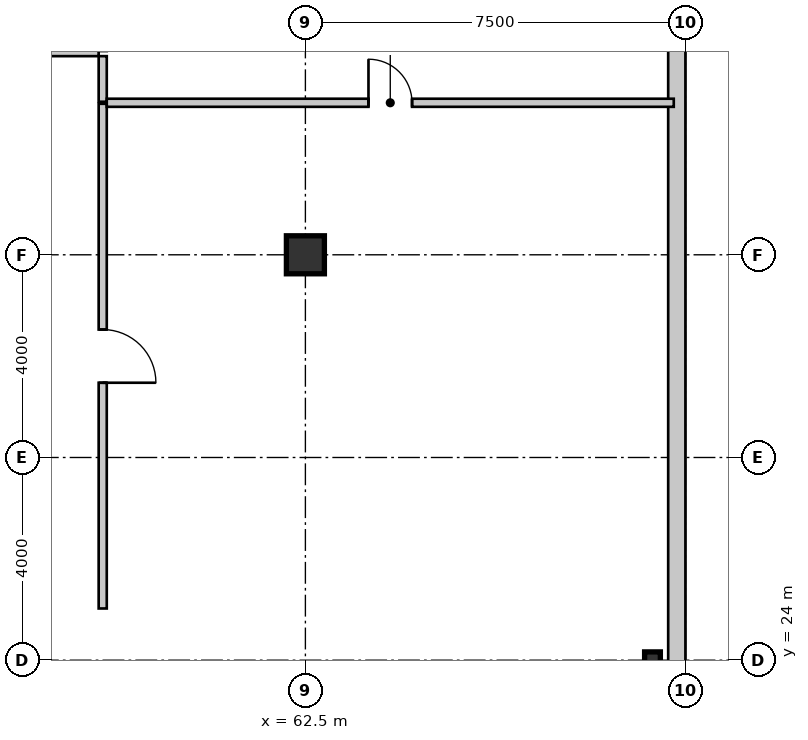
"""IFC4 building model, lengths in metres.
Left out: names, types, materials, properties, quantities, classifications, styles, units other than length and angle.
Written with IfcOpenShell. Run it as: python <this file> out.ifc"""

import sys

from ifc_helpers import new_model, si_unit, direction, frame, frame_2d, origin, origin_2d, place, context, subcontext, project, spatial, rectangle, circle, i_section, extrude, source, transform, mapped, element, fill, save


model = new_model("IFC4")
c1 = context("Model", 3, precision=1e-05, world=origin(), true_north=direction((0.0, 1.0)))
c2 = subcontext(c1, "Body", "Model", "MODEL_VIEW")
j1 = project(units=[si_unit("LENGTHUNIT", "METRE"), si_unit("PLANEANGLEUNIT", "RADIAN")], contexts=[c1])
p1 = place(None, origin())
s1 = spatial("IfcSite", under=j1, at=p1, CompositionType="ELEMENT")
p2 = place(p1, origin())
s2 = spatial("IfcBuilding", under=s1, at=p2, CompositionType="ELEMENT")
p3 = place(p2, frame((0.0, 0.0, 8.4)))
s3 = spatial("IfcBuildingStorey", under=s2, at=p3, CompositionType="ELEMENT", Elevation=8.4)
m1 = source(origin(), c2, "Body", "SweptSolid", [
    extrude(circle(Radius=0.375, at=origin_2d()), origin(), (0.0, 0.0, 1.0), 4.55),
])
p4 = place(p3, frame((62.5, 32.0, 0.0), z_axis=(0.0, 0.0, 1.0), x_axis=(1.0, 0.0, 0.0)))
e1 = element("IfcColumn", 1, at=p4, inside=s3, PredefinedType="COLUMN", context=c2, shape_type="MappedRepresentation", body=[
    mapped(m1, transform((0.0, 0.0, 0.0), scale=1.0)),
])
m2 = source(origin(), c2, "Body", "SweptSolid", [
    extrude(i_section(OverallWidth=0.311, OverallDepth=0.327, WebThickness=0.016, FlangeThickness=0.025, at=origin_2d()), origin(), (0.0, 0.0, 1.0), 4.55),
])
p5 = place(p3, frame((69.35, 24.0, 0.0), z_axis=(0.0, 0.0, 1.0), x_axis=(1.0, 0.0, 0.0)))
e2 = element("IfcColumn", 2, at=p5, inside=s3, PredefinedType="COLUMN", context=c2, shape_type="MappedRepresentation", body=[
    mapped(m2, transform((0.0, 0.0, 0.0), scale=1.0)),
])
m3 = source(origin(), c2, "Body", "SweptSolid", [
    extrude(rectangle(XDim=39.66, YDim=0.34, at=frame_2d((19.83, 0.0))), origin(), (0.0, 0.0, 1.0), 4.29),
])
p6 = place(p3, frame((69.83, 0.17, 0.0), z_axis=(0.0, 0.0, 1.0), x_axis=(0.0, 1.0, 0.0)))
e3 = element("IfcWall", 3, at=p6, inside=s3, PredefinedType="SOLIDWALL", context=c2, shape_type="MappedRepresentation", body=[
    mapped(m3, transform((0.0, 0.0, 0.0), scale=1.0)),
])
m4 = source(origin(), c2, "Body", "SweptSolid", [
    extrude(rectangle(XDim=1.8, YDim=1.6, at=frame_2d((0.9, 0.8))), frame((0.0, 0.18, 0.0), z_axis=(0.0, -1.0, 0.0), x_axis=(1.0, 0.0, 0.0)), (0.0, 0.0, 1.0), 0.36),
])
p7 = place(p6, frame((3.2, 0.0, 0.95)))
e4 = element("IfcOpeningElement", 4, at=p7, cuts=e3, PredefinedType="OPENING", context=c2, shape_type="MappedRepresentation", body=[
    mapped(m4, transform((0.0, 0.0, 0.0), scale=1.0)),
])
m5 = source(origin(), c2, "Body", "SweptSolid", [
    extrude(rectangle(XDim=1.5, YDim=1.5, at=frame_2d((0.75, 0.75))), frame((0.0, 0.18, 0.0), z_axis=(0.0, -1.0, 0.0), x_axis=(1.0, 0.0, 0.0)), (0.0, 0.0, 1.0), 0.36),
])
p8 = place(p6, frame((7.8, 0.0, 0.95)))
e5 = element("IfcOpeningElement", 5, at=p8, cuts=e3, PredefinedType="OPENING", context=c2, shape_type="MappedRepresentation", body=[
    mapped(m5, transform((0.0, 0.0, 0.0), scale=1.0)),
])
m6 = source(origin(), c2, "Body", "SweptSolid", [
    extrude(rectangle(XDim=1.2, YDim=1.5, at=frame_2d((0.6, 0.75))), frame((0.0, 0.18, 0.0), z_axis=(0.0, -1.0, 0.0), x_axis=(1.0, 0.0, 0.0)), (0.0, 0.0, 1.0), 0.36),
])
p9 = place(p6, frame((21.2, 0.0, 0.95)))
e6 = element("IfcOpeningElement", 6, at=p9, cuts=e3, PredefinedType="OPENING", context=c2, shape_type="MappedRepresentation", body=[
    mapped(m6, transform((0.0, 0.0, 0.0), scale=1.0)),
])
m7 = source(origin(), c2, "Body", "SweptSolid", [
    extrude(rectangle(XDim=2.4, YDim=1.8, at=frame_2d((1.2, 0.9))), frame((0.0, 0.18, 0.0), z_axis=(0.0, -1.0, 0.0), x_axis=(1.0, 0.0, 0.0)), (0.0, 0.0, 1.0), 0.36),
])
p10 = place(p6, frame((36.0, 0.0, 0.95)))
e7 = element("IfcOpeningElement", 7, at=p10, cuts=e3, PredefinedType="OPENING", context=c2, shape_type="MappedRepresentation", body=[
    mapped(m7, transform((0.0, 0.0, 0.0), scale=1.0)),
])
m8 = source(origin(), c2, "Body", "SweptSolid", [
    extrude(rectangle(XDim=9.959, YDim=0.16, at=frame_2d((4.98, 0.0))), origin(), (0.0, 0.0, 1.0), 4.29),
])
p11 = place(p3, frame((58.5, 34.98, 0.0), z_axis=(0.0, 0.0, 1.0), x_axis=(0.0, -1.0, 0.0)))
e8 = element("IfcWall", 8, at=p11, inside=s3, PredefinedType="PARTITIONING", context=c2, shape_type="MappedRepresentation", body=[
    mapped(m8, transform((0.0, 0.0, 0.0), scale=1.0)),
])
m9 = source(origin(), c2, "Body", "SweptSolid", [
    extrude(rectangle(XDim=1.05, YDim=2.1, at=frame_2d((0.525, 1.05))), frame((0.0, 0.09, 0.0), z_axis=(0.0, -1.0, 0.0), x_axis=(1.0, 0.0, 0.0)), (0.0, 0.0, 1.0), 0.18),
])
p12 = place(p11, frame((4.455, 0.0, 0.0)))
e9 = element("IfcOpeningElement", 9, at=p12, cuts=e8, PredefinedType="OPENING", context=c2, shape_type="MappedRepresentation", body=[
    mapped(m9, transform((0.0, 0.0, 0.0), scale=1.0)),
])
m10 = source(origin(), c2, "Body", "SweptSolid", [
    extrude(rectangle(XDim=0.9, YDim=0.16, at=frame_2d((0.45, 0.0))), origin(), (0.0, 0.0, 1.0), 4.29),
])
p13 = place(p3, frame((58.5, 35.92, 0.0), z_axis=(0.0, 0.0, 1.0), x_axis=(0.0, -1.0, 0.0)))
e10 = element("IfcWall", 10, at=p13, inside=s3, PredefinedType="PARTITIONING", context=c2, shape_type="MappedRepresentation", body=[
    mapped(m10, transform((0.0, 0.0, 0.0), scale=1.0)),
])
m11 = source(origin(), c2, "Body", "SweptSolid", [
    extrude(rectangle(XDim=2.84, YDim=0.16, at=frame_2d((1.42, 0.0))), origin(), (0.0, 0.0, 1.0), 4.29),
])
p14 = place(p3, frame((55.58, 36.0, 0.0), z_axis=(0.0, 0.0, 1.0), x_axis=(1.0, 0.0, 0.0)))
e11 = element("IfcWall", 11, at=p14, inside=s3, PredefinedType="PARTITIONING", context=c2, shape_type="MappedRepresentation", body=[
    mapped(m11, transform((0.0, 0.0, 0.0), scale=1.0)),
])
m12 = source(origin(), c2, "Body", "SweptSolid", [
    extrude(rectangle(XDim=11.19, YDim=0.16, at=frame_2d((5.595, 0.0))), origin(), (0.0, 0.0, 1.0), 4.29),
])
p15 = place(p3, frame((58.58, 35.0, 0.0), z_axis=(0.0, 0.0, 1.0), x_axis=(1.0, 0.0, 0.0)))
e12 = element("IfcWall", 12, at=p15, inside=s3, PredefinedType="PARTITIONING", context=c2, shape_type="MappedRepresentation", body=[
    mapped(m12, transform((0.0, 0.0, 0.0), scale=1.0)),
])
m13 = source(origin(), c2, "Body", "SweptSolid", [
    extrude(rectangle(XDim=0.86, YDim=2.1, at=frame_2d((0.43, 1.05))), frame((0.0, 0.09, 0.0), z_axis=(0.0, -1.0, 0.0), x_axis=(1.0, 0.0, 0.0)), (0.0, 0.0, 1.0), 0.18),
])
p16 = place(p15, frame((5.165, 0.0, 0.0)))
e13 = element("IfcOpeningElement", 13, at=p16, cuts=e12, PredefinedType="OPENING", context=c2, shape_type="MappedRepresentation", body=[
    mapped(m13, transform((0.0, 0.0, 0.0), scale=1.0)),
])
m14 = source(origin(), c2, "Body", "SweptSolid", [
    extrude(rectangle(XDim=1.05, YDim=2.1, at=frame_2d((0.525, 1.05))), frame((0.0, 0.025, 0.0), z_axis=(0.0, -1.0, 0.0), x_axis=(1.0, 0.0, 0.0)), (0.0, 0.0, 1.0), 0.05),
])
p17 = place(p12, origin())
e14 = element("IfcDoor", 14, at=p17, inside=s3, OperationType="SINGLE_SWING_RIGHT", PredefinedType="DOOR", context=c2, shape_type="MappedRepresentation", body=[
    mapped(m14, transform((0.0, 0.0, 0.0), scale=1.0)),
])
fill(e9, e14)
m15 = source(origin(), c2, "Body", "SweptSolid", [
    extrude(rectangle(XDim=0.86, YDim=2.1, at=frame_2d((0.43, 1.05))), frame((0.0, 0.025, 0.0), z_axis=(0.0, -1.0, 0.0), x_axis=(1.0, 0.0, 0.0)), (0.0, 0.0, 1.0), 0.05),
])
p18 = place(p16, origin())
e15 = element("IfcDoor", 15, at=p18, inside=s3, OperationType="SINGLE_SWING_LEFT", PredefinedType="DOOR", context=c2, shape_type="MappedRepresentation", body=[
    mapped(m15, transform((0.0, 0.0, 0.0), scale=1.0)),
])
fill(e13, e15)
save(model, sys.argv[1])
